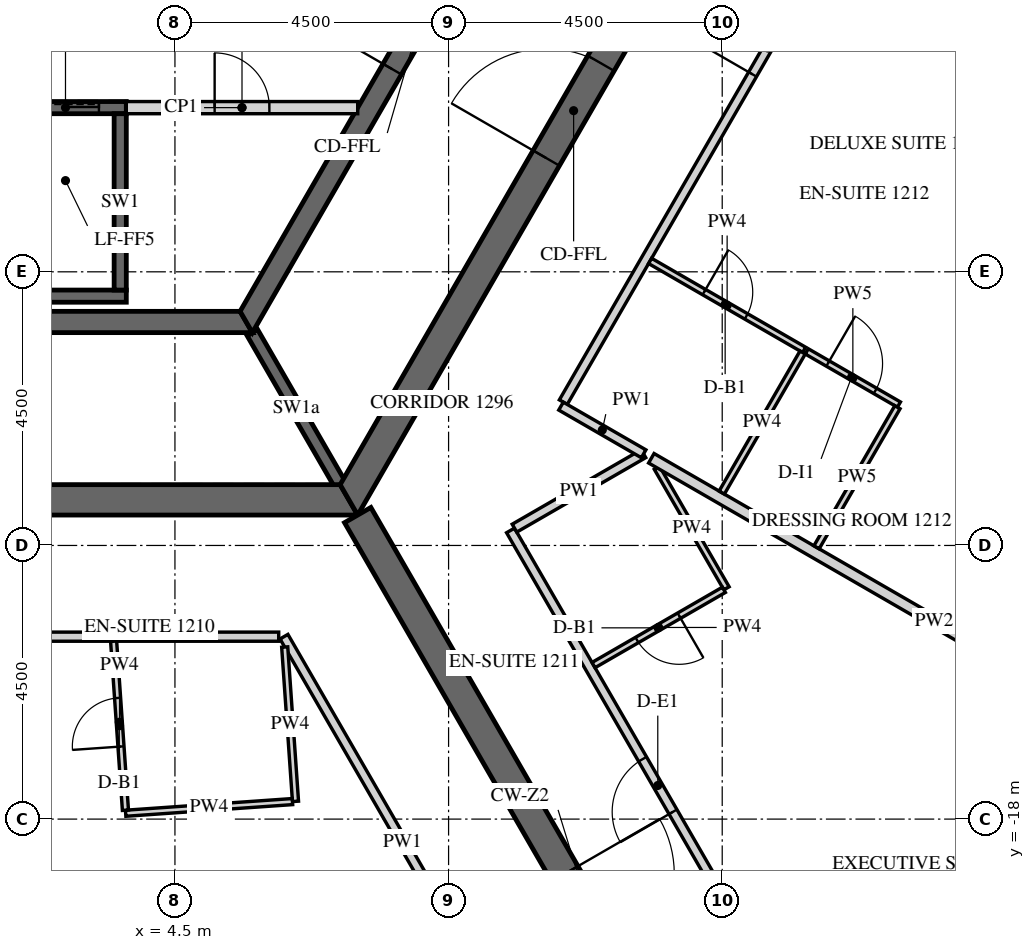
"""IFC4 building model, lengths in metres.
Left out: names, types, materials, properties, quantities, classifications, styles, units other than length and angle.
Written with IfcOpenShell. Run it as: python <this file> out.ifc"""

import sys

from ifc_helpers import new_model, si_unit, direction, frame, frame_2d, origin, place, context, subcontext, project, spatial, polyline, rectangle, outline, extrude, element, fill, save


model = new_model("IFC4")
c1 = context("Model", 3, precision=1e-05, world=origin(), true_north=direction((0.0, 1.0)))
c2 = subcontext(c1, "Body", "Model", "MODEL_VIEW")
j1 = project(units=[si_unit("LENGTHUNIT", "METRE"), si_unit("PLANEANGLEUNIT", "RADIAN")], contexts=[c1])
p1 = place(None, origin())
s1 = spatial("IfcSite", under=j1, at=p1, CompositionType="ELEMENT")
p2 = place(p1, origin())
s2 = spatial("IfcBuilding", under=s1, at=p2, CompositionType="ELEMENT")
p3 = place(p2, frame((0.0, 0.0, 164.4)))
s3 = spatial("IfcBuildingStorey", under=s2, at=p3, CompositionType="ELEMENT", Elevation=164.4)
p4 = place(p3, frame((-7.361, -12.75, -0.15), z_axis=(0.0, 0.0, 1.0), x_axis=(1.0, 0.0, 0.0)))
e1 = element("IfcWall", 1, at=p4, inside=s3, PredefinedType="SHEAR", context=c2, shape_type="SweptSolid", body=[
    extrude(outline(polyline([(-0.144, -0.25), (14.866, -0.25), (14.578, 0.25), (0.144, 0.25), (-0.144, -0.25)])), origin(), (0.0, 0.0, 1.0), 3.9),
])
p5 = place(p4, frame((6.761, 0.0, 0.15)))
e2 = element("IfcOpeningElement", 2, at=p5, cuts=e1, PredefinedType="OPENING", context=c2, shape_type="SweptSolid", body=[
    extrude(rectangle(XDim=1.2, YDim=2.4, at=frame_2d((0.6, 1.2))), frame((0.0, 0.26, 0.0), z_axis=(0.0, -1.0, 0.0), x_axis=(1.0, 0.0, 0.0)), (0.0, 0.0, 1.0), 0.52),
])
p6 = place(p3, frame((7.361, -12.75, -0.15), z_axis=(0.0, 0.0, 1.0), x_axis=(0.50000571537, 0.866022103989, 0.0)))
e3 = element("IfcWall", 3, at=p6, inside=s3, PredefinedType="SHEAR", context=c2, shape_type="SweptSolid", body=[
    extrude(outline(polyline([(-0.144, -0.25), (14.867, -0.25), (14.578, 0.25), (0.144, 0.25), (-0.144, -0.25)])), origin(), (0.0, 0.0, 1.0), 3.9),
])
p7 = place(p6, frame((6.49, 0.0, 0.15)))
e4 = element("IfcOpeningElement", 4, at=p7, cuts=e3, PredefinedType="OPENING", context=c2, shape_type="SweptSolid", body=[
    extrude(rectangle(XDim=1.8, YDim=2.4, at=frame_2d((0.9, 1.2))), frame((0.0, 0.26, 0.0), z_axis=(0.0, -1.0, 0.0), x_axis=(1.0, 0.0, 0.0)), (0.0, 0.0, 1.0), 0.52),
])
p8 = place(p3, frame((7.506, -13.0, -0.15), z_axis=(0.0, 0.0, 1.0), x_axis=(0.499988271576, -0.866032175087, 0.0)))
e5 = element("IfcWall", 5, at=p8, inside=s3, PredefinedType="SHEAR", context=c2, shape_type="SweptSolid", body=[
    extrude(rectangle(XDim=15.424, YDim=0.5, at=frame_2d((7.712, 0.0))), origin(), (0.0, 0.0, 1.0), 3.9),
])
p9 = place(p8, frame((6.812, 0.0, 0.15)))
e6 = element("IfcOpeningElement", 6, at=p9, cuts=e5, PredefinedType="OPENING", context=c2, shape_type="SweptSolid", body=[
    extrude(rectangle(XDim=1.8, YDim=2.4, at=frame_2d((0.9, 1.2))), frame((0.0, 0.26, 0.0), z_axis=(0.0, -1.0, 0.0), x_axis=(1.0, 0.0, 0.0)), (0.0, 0.0, 1.0), 0.52),
])
p10 = place(p3, frame((-5.673, -9.825, -0.15), z_axis=(0.0, 0.0, 1.0), x_axis=(1.0, 0.0, 0.0)))
e7 = element("IfcWall", 7, at=p10, inside=s3, PredefinedType="SHEAR", context=c2, shape_type="SweptSolid", body=[
    extrude(outline(polyline([(-0.101, -0.175), (11.446, -0.175), (11.244, 0.175), (0.101, 0.175), (-0.101, -0.175)])), origin(), (0.0, 0.0, 1.0), 3.9),
])
p11 = place(p3, frame((5.673, -9.825, -0.15), z_axis=(0.0, 0.0, 1.0), x_axis=(0.499995046907, 0.866028263435, 0.0)))
e8 = element("IfcWall", 8, at=p11, inside=s3, PredefinedType="SHEAR", context=c2, shape_type="SweptSolid", body=[
    extrude(outline(polyline([(-0.101, -0.175), (11.446, -0.175), (11.244, 0.175), (0.101, 0.175), (-0.101, -0.175)])), origin(), (0.0, 0.0, 1.0), 3.9),
])
p12 = place(p11, frame((4.801, 0.0, 0.15)))
e9 = element("IfcOpeningElement", 9, at=p12, cuts=e8, PredefinedType="OPENING", context=c2, shape_type="SweptSolid", body=[
    extrude(rectangle(XDim=1.8, YDim=2.4, at=frame_2d((0.9, 1.2))), frame((0.0, 0.185, 0.0), z_axis=(0.0, -1.0, 0.0), x_axis=(1.0, 0.0, 0.0)), (0.0, 0.0, 1.0), 0.37),
])
p13 = place(p3, frame((-5.5, -6.3, -0.25), z_axis=(0.0, 0.0, 1.0), x_axis=(1.0, 0.0, 0.0)))
e10 = element("IfcWall", 10, at=p13, inside=s3, PredefinedType="SHEAR", context=c2, shape_type="SweptSolid", body=[
    extrude(rectangle(XDim=9.2, YDim=0.2, at=frame_2d((4.6, 0.0))), origin(), (0.0, 0.0, 1.0), 3.9),
])
p14 = place(p13, frame((0.45, 0.0, 0.25)))
e11 = element("IfcOpeningElement", 11, at=p14, cuts=e10, PredefinedType="OPENING", context=c2, shape_type="SweptSolid", body=[
    extrude(rectangle(XDim=1.1, YDim=2.1, at=frame_2d((0.55, 1.05))), frame((0.0, 0.11, 0.0), z_axis=(0.0, -1.0, 0.0), x_axis=(1.0, 0.0, 0.0)), (0.0, 0.0, 1.0), 0.22),
])
p15 = place(p13, frame((2.25, 0.0, 0.25)))
e12 = element("IfcOpeningElement", 12, at=p15, cuts=e10, PredefinedType="OPENING", context=c2, shape_type="SweptSolid", body=[
    extrude(rectangle(XDim=1.1, YDim=2.1, at=frame_2d((0.55, 1.05))), frame((0.0, 0.11, 0.0), z_axis=(0.0, -1.0, 0.0), x_axis=(1.0, 0.0, 0.0)), (0.0, 0.0, 1.0), 0.22),
])
p16 = place(p13, frame((4.05, 0.0, 0.25)))
e13 = element("IfcOpeningElement", 13, at=p16, cuts=e10, PredefinedType="OPENING", context=c2, shape_type="SweptSolid", body=[
    extrude(rectangle(XDim=1.1, YDim=2.1, at=frame_2d((0.55, 1.05))), frame((0.0, 0.11, 0.0), z_axis=(0.0, -1.0, 0.0), x_axis=(1.0, 0.0, 0.0)), (0.0, 0.0, 1.0), 0.22),
])
p17 = place(p13, frame((5.85, 0.0, 0.25)))
e14 = element("IfcOpeningElement", 14, at=p17, cuts=e10, PredefinedType="OPENING", context=c2, shape_type="SweptSolid", body=[
    extrude(rectangle(XDim=1.1, YDim=2.1, at=frame_2d((0.55, 1.05))), frame((0.0, 0.11, 0.0), z_axis=(0.0, -1.0, 0.0), x_axis=(1.0, 0.0, 0.0)), (0.0, 0.0, 1.0), 0.22),
])
p18 = place(p13, frame((7.65, 0.0, 0.25)))
e15 = element("IfcOpeningElement", 15, at=p18, cuts=e10, PredefinedType="OPENING", context=c2, shape_type="SweptSolid", body=[
    extrude(rectangle(XDim=1.1, YDim=2.1, at=frame_2d((0.55, 1.05))), frame((0.0, 0.11, 0.0), z_axis=(0.0, -1.0, 0.0), x_axis=(1.0, 0.0, 0.0)), (0.0, 0.0, 1.0), 0.22),
])
p19 = place(p3, frame((-5.5, -9.4, -0.25), z_axis=(0.0, 0.0, 1.0), x_axis=(1.0, 0.0, 0.0)))
e16 = element("IfcWall", 16, at=p19, inside=s3, PredefinedType="SHEAR", context=c2, shape_type="SweptSolid", body=[
    extrude(rectangle(XDim=9.2, YDim=0.2, at=frame_2d((4.6, 0.0))), origin(), (0.0, 0.0, 1.0), 3.9),
])
p20 = place(p3, frame((3.6, -9.3, -0.25), z_axis=(0.0, 0.0, 1.0), x_axis=(0.0, 1.0, 0.0)))
e17 = element("IfcWall", 17, at=p20, inside=s3, PredefinedType="SHEAR", context=c2, shape_type="SweptSolid", body=[
    extrude(rectangle(XDim=2.9, YDim=0.2, at=frame_2d((1.45, 0.0))), origin(), (0.0, 0.0, 1.0), 3.9),
])
p21 = place(p3, frame((3.7, -6.3, 0.0), z_axis=(0.0, 0.0, 1.0), x_axis=(1.0, 0.0, 0.0)))
e18 = element("IfcWall", 18, at=p21, inside=s3, PredefinedType="PARTITIONING", context=c2, shape_type="SweptSolid", body=[
    extrude(rectangle(XDim=3.806, YDim=0.2, at=frame_2d((1.903, 0.0))), origin(), (0.0, 0.0, 1.0), 3.65),
])
p22 = place(p21, frame((1.453, 0.0, 0.0)))
e19 = element("IfcOpeningElement", 19, at=p22, cuts=e18, PredefinedType="OPENING", context=c2, shape_type="SweptSolid", body=[
    extrude(rectangle(XDim=0.9, YDim=2.1, at=frame_2d((0.45, 1.05))), frame((0.0, 0.11, 0.0), z_axis=(0.0, -1.0, 0.0), x_axis=(1.0, 0.0, 0.0)), (0.0, 0.0, 1.0), 0.22),
])
p23 = place(p3, frame((5.773, -10.0, -0.15), z_axis=(0.0, 0.0, 1.0), x_axis=(0.499995765644, -0.866027848477, 0.0)))
e20 = element("IfcWall", 20, at=p23, inside=s3, PredefinedType="SHEAR", context=c2, shape_type="SweptSolid", body=[
    extrude(rectangle(XDim=2.887, YDim=0.2, at=frame_2d((1.443, 0.0))), origin(), (0.0, 0.0, 1.0), 3.9),
])
p24 = place(p3, frame((-8.574, -15.0, 0.0), z_axis=(0.0, 0.0, 1.0), x_axis=(1.0, 0.0, 0.0)))
e21 = element("IfcWall", 21, at=p24, inside=s3, PredefinedType="PARTITIONING", context=c2, shape_type="SweptSolid", body=[
    extrude(rectangle(XDim=14.78, YDim=0.15, at=frame_2d((7.39, 0.0))), origin(), (0.0, 0.0, 1.0), 2.988),
])
p25 = place(p24, frame((4.445, 0.0, 0.0)))
e22 = element("IfcOpeningElement", 22, at=p25, cuts=e21, PredefinedType="OPENING", context=c2, shape_type="SweptSolid", body=[
    extrude(rectangle(XDim=1.0, YDim=2.1, at=frame_2d((0.5, 1.05))), frame((0.0, 0.085, 0.0), z_axis=(0.0, -1.0, 0.0), x_axis=(1.0, 0.0, 0.0)), (0.0, 0.0, 1.0), 0.17),
])
p26 = place(p24, frame((8.885, 0.0, 0.0)))
e23 = element("IfcOpeningElement", 23, at=p26, cuts=e21, PredefinedType="OPENING", context=c2, shape_type="SweptSolid", body=[
    extrude(rectangle(XDim=1.0, YDim=2.1, at=frame_2d((0.5, 1.05))), frame((0.0, 0.085, 0.0), z_axis=(0.0, -1.0, 0.0), x_axis=(1.0, 0.0, 0.0)), (0.0, 0.0, 1.0), 0.17),
])
p27 = place(p3, frame((6.293, -15.0, 0.0), z_axis=(0.0, 0.0, 1.0), x_axis=(0.499980313799, -0.86603676932, 0.0)))
e24 = element("IfcWall", 24, at=p27, inside=s3, PredefinedType="PARTITIONING", context=c2, shape_type="SweptSolid", body=[
    extrude(rectangle(XDim=7.786, YDim=0.15, at=frame_2d((3.893, 0.0))), origin(), (0.0, 0.0, 1.0), 2.988),
])
p28 = place(p3, frame((13.699, -19.628, 0.0), z_axis=(0.0, 0.0, 1.0), x_axis=(-0.499995202058, 0.86602817386, 0.0)))
e25 = element("IfcWall", 25, at=p28, inside=s3, PredefinedType="PARTITIONING", context=c2, shape_type="SweptSolid", body=[
    extrude(rectangle(XDim=7.361, YDim=0.15, at=frame_2d((3.68, 0.0))), origin(), (0.0, 0.0, 1.0), 2.988),
])
p29 = place(p28, frame((2.018, 0.0, 0.0)))
e26 = element("IfcOpeningElement", 26, at=p29, cuts=e25, PredefinedType="OPENING", context=c2, shape_type="SweptSolid", body=[
    extrude(rectangle(XDim=1.0, YDim=2.1, at=frame_2d((0.5, 1.05))), frame((0.0, 0.085, 0.0), z_axis=(0.0, -1.0, 0.0), x_axis=(1.0, 0.0, 0.0)), (0.0, 0.0, 1.0), 0.17),
])
p30 = place(p3, frame((10.084, -13.216, 0.0), z_axis=(0.0, 0.0, 1.0), x_axis=(0.866026229868, 0.499998569178, 0.0)))
e27 = element("IfcWall", 27, at=p30, inside=s3, PredefinedType="PARTITIONING", context=c2, shape_type="SweptSolid", body=[
    extrude(rectangle(XDim=2.449, YDim=0.15, at=frame_2d((1.225, 0.0))), origin(), (0.0, 0.0, 1.0), 2.988),
])
p31 = place(p3, frame((10.887, -11.144, 0.0), z_axis=(0.0, 0.0, 1.0), x_axis=(0.500006037985, 0.866021917724, 0.0)))
e28 = element("IfcWall", 28, at=p31, inside=s3, PredefinedType="PARTITIONING", context=c2, shape_type="SweptSolid", body=[
    extrude(rectangle(XDim=12.867, YDim=0.15, at=frame_2d((6.434, 0.0))), origin(), (0.0, 0.0, 1.0), 2.988),
])
p32 = place(p31, frame((6.225, 0.0, 0.0)))
e29 = element("IfcOpeningElement", 29, at=p32, cuts=e28, PredefinedType="OPENING", context=c2, shape_type="SweptSolid", body=[
    extrude(rectangle(XDim=1.0, YDim=2.1, at=frame_2d((0.5, 1.05))), frame((0.0, 0.085, 0.0), z_axis=(0.0, -1.0, 0.0), x_axis=(1.0, 0.0, 0.0)), (0.0, 0.0, 1.0), 0.17),
])
p33 = place(p31, frame((11.717, 0.0, 0.0)))
e30 = element("IfcOpeningElement", 30, at=p33, cuts=e28, PredefinedType="OPENING", context=c2, shape_type="SweptSolid", body=[
    extrude(rectangle(XDim=1.0, YDim=2.1, at=frame_2d((0.5, 1.05))), frame((0.0, 0.085, 0.0), z_axis=(0.0, -1.0, 0.0), x_axis=(1.0, 0.0, 0.0)), (0.0, 0.0, 1.0), 0.17),
])
p34 = place(p3, frame((12.208, -11.993, 0.0), z_axis=(0.0, 0.0, 1.0), x_axis=(-0.866011891242, 0.50002340368, 0.0)))
e31 = element("IfcWall", 31, at=p34, inside=s3, PredefinedType="PARTITIONING", context=c2, shape_type="SweptSolid", body=[
    extrude(rectangle(XDim=1.568, YDim=0.15, at=frame_2d((0.784, 0.0))), origin(), (0.0, 0.0, 1.0), 2.988),
])
p35 = place(p3, frame((6.305, -15.171, 0.0), z_axis=(0.0, 0.0, 1.0), x_axis=(0.069671554491, -0.99756998476, 0.0)))
e32 = element("IfcWall", 32, at=p35, inside=s3, PredefinedType="PARTITIONING", context=c2, shape_type="SweptSolid", body=[
    extrude(rectangle(XDim=2.544, YDim=0.1, at=frame_2d((1.272, 0.0))), origin(), (0.0, 0.0, 1.0), 2.988),
])
p36 = place(p3, frame((6.433, -17.712, 0.0), z_axis=(0.0, 0.0, 1.0), x_axis=(-0.997562614302, -0.069777005859, 0.0)))
e33 = element("IfcWall", 33, at=p36, inside=s3, PredefinedType="PARTITIONING", context=c2, shape_type="SweptSolid", body=[
    extrude(rectangle(XDim=2.75, YDim=0.1, at=frame_2d((1.375, 0.0))), origin(), (0.0, 0.0, 1.0), 2.988),
])
p37 = place(p3, frame((3.686, -17.854, 0.0), z_axis=(0.0, 0.0, 1.0), x_axis=(-0.069758488261, 0.997563909389, 0.0)))
e34 = element("IfcWall", 34, at=p37, inside=s3, PredefinedType="PARTITIONING", context=c2, shape_type="SweptSolid", body=[
    extrude(rectangle(XDim=2.786, YDim=0.1, at=frame_2d((1.393, 0.0))), origin(), (0.0, 0.0, 1.0), 2.988),
])
p38 = place(p37, frame((1.05, 0.0, 0.0)))
e35 = element("IfcOpeningElement", 35, at=p38, cuts=e34, PredefinedType="OPENING", context=c2, shape_type="SweptSolid", body=[
    extrude(rectangle(XDim=0.8, YDim=2.1, at=frame_2d((0.4, 1.05))), frame((0.0, 0.06, 0.0), z_axis=(0.0, -1.0, 0.0), x_axis=(1.0, 0.0, 0.0)), (0.0, 0.0, 1.0), 0.12),
])
p39 = place(p3, frame((12.426, -12.223, 0.0), z_axis=(0.0, 0.0, 1.0), x_axis=(0.499959451571, -0.866048813165, 0.0)))
e36 = element("IfcWall", 36, at=p39, inside=s3, PredefinedType="PARTITIONING", context=c2, shape_type="SweptSolid", body=[
    extrude(rectangle(XDim=2.289, YDim=0.1, at=frame_2d((1.145, 0.0))), origin(), (0.0, 0.0, 1.0), 2.988),
])
p40 = place(p3, frame((13.527, -14.23, 0.0), z_axis=(0.0, 0.0, 1.0), x_axis=(-0.866006523861, -0.500032699561, 0.0)))
e37 = element("IfcWall", 37, at=p40, inside=s3, PredefinedType="PARTITIONING", context=c2, shape_type="SweptSolid", body=[
    extrude(rectangle(XDim=2.475, YDim=0.1, at=frame_2d((1.237, 0.0))), origin(), (0.0, 0.0, 1.0), 2.988),
])
p41 = place(p40, frame((0.85, 0.0, 0.0)))
e38 = element("IfcOpeningElement", 38, at=p41, cuts=e37, PredefinedType="OPENING", context=c2, shape_type="SweptSolid", body=[
    extrude(rectangle(XDim=0.8, YDim=2.1, at=frame_2d((0.4, 1.05))), frame((0.0, 0.06, 0.0), z_axis=(0.0, -1.0, 0.0), x_axis=(1.0, 0.0, 0.0)), (0.0, 0.0, 1.0), 0.12),
])
p42 = place(p3, frame((21.631, -17.433, 0.0), z_axis=(0.0, 0.0, 1.0), x_axis=(-0.866030310389, 0.499991501415, 0.0)))
e39 = element("IfcWall", 39, at=p42, inside=s3, PredefinedType="PARTITIONING", context=c2, shape_type="SweptSolid", body=[
    extrude(rectangle(XDim=10.735, YDim=0.18, at=frame_2d((5.368, 0.0))), origin(), (0.0, 0.0, 1.0), 2.988),
])
p43 = place(p3, frame((12.314, -8.821, 0.0), z_axis=(0.0, 0.0, 1.0), x_axis=(0.866046596414, -0.499963291492, 0.0)))
e40 = element("IfcWall", 40, at=p43, inside=s3, PredefinedType="PARTITIONING", context=c2, shape_type="SweptSolid", body=[
    extrude(rectangle(XDim=2.925, YDim=0.1, at=frame_2d((1.462, 0.0))), origin(), (0.0, 0.0, 1.0), 2.988),
])
p44 = place(p43, frame((1.025, 0.0, 0.0)))
e41 = element("IfcOpeningElement", 41, at=p44, cuts=e40, PredefinedType="OPENING", context=c2, shape_type="SweptSolid", body=[
    extrude(rectangle(XDim=0.8, YDim=2.1, at=frame_2d((0.4, 1.05))), frame((0.0, 0.06, 0.0), z_axis=(0.0, -1.0, 0.0), x_axis=(1.0, 0.0, 0.0)), (0.0, 0.0, 1.0), 0.12),
])
p45 = place(p3, frame((14.891, -10.309, 0.0), z_axis=(0.0, 0.0, 1.0), x_axis=(0.866036909293, -0.499980071345, 0.0)))
e42 = element("IfcWall", 42, at=p45, inside=s3, PredefinedType="PARTITIONING", context=c2, shape_type="SweptSolid", body=[
    extrude(rectangle(XDim=1.75, YDim=0.1, at=frame_2d((0.875, 0.0))), origin(), (0.0, 0.0, 1.0), 2.988),
])
p46 = place(p45, frame((0.4, 0.0, 0.0)))
e43 = element("IfcOpeningElement", 43, at=p46, cuts=e42, PredefinedType="OPENING", context=c2, shape_type="SweptSolid", body=[
    extrude(rectangle(XDim=0.9, YDim=2.1, at=frame_2d((0.45, 1.05))), frame((0.0, 0.06, 0.0), z_axis=(0.0, -1.0, 0.0), x_axis=(1.0, 0.0, 0.0)), (0.0, 0.0, 1.0), 0.12),
])
p47 = place(p3, frame((16.381, -11.227, 0.0), z_axis=(0.0, 0.0, 1.0), x_axis=(-0.500008456887, -0.866020521143, 0.0)))
e44 = element("IfcWall", 44, at=p47, inside=s3, PredefinedType="PARTITIONING", context=c2, shape_type="SweptSolid", body=[
    extrude(rectangle(XDim=2.66, YDim=0.1, at=frame_2d((1.33, 0.0))), origin(), (0.0, 0.0, 1.0), 2.988),
])
p48 = place(p3, frame((27.031, -8.08, 0.0), z_axis=(0.0, 0.0, 1.0), x_axis=(-0.866024931941, 0.500000817256, 0.0)))
e45 = element("IfcWall", 45, at=p48, inside=s3, PredefinedType="PARTITIONING", context=c2, shape_type="SweptSolid", body=[
    extrude(rectangle(XDim=12.375, YDim=0.18, at=frame_2d((6.188, 0.0))), origin(), (0.0, 0.0, 1.0), 2.988),
])
p49 = place(p3, frame((13.492, -12.63, 0.0), z_axis=(0.0, 0.0, 1.0), x_axis=(0.50004820116, 0.865997573043, 0.0)))
e46 = element("IfcWall", 46, at=p49, inside=s3, PredefinedType="PARTITIONING", context=c2, shape_type="SweptSolid", body=[
    extrude(rectangle(XDim=2.66, YDim=0.1, at=frame_2d((1.33, 0.0))), origin(), (0.0, 0.0, 1.0), 2.988),
])
p50 = place(p7, origin())
e47 = element("IfcDoor", 47, at=p50, inside=s3, OperationType="DOUBLE_DOOR_SINGLE_SWING", PredefinedType="DOOR", context=c2, shape_type="SweptSolid", body=[
    extrude(rectangle(XDim=1.8, YDim=2.4, at=frame_2d((0.9, 1.2))), frame((0.0, 0.025, 0.0), z_axis=(0.0, -1.0, 0.0), x_axis=(1.0, 0.0, 0.0)), (0.0, 0.0, 1.0), 0.05),
])
fill(e4, e47)
p51 = place(p12, origin())
e48 = element("IfcDoor", 48, at=p51, inside=s3, OperationType="DOUBLE_DOOR_SINGLE_SWING", PredefinedType="DOOR", context=c2, shape_type="SweptSolid", body=[
    extrude(rectangle(XDim=1.8, YDim=2.4, at=frame_2d((0.9, 1.2))), frame((0.0, 0.025, 0.0), z_axis=(0.0, -1.0, 0.0), x_axis=(1.0, 0.0, 0.0)), (0.0, 0.0, 1.0), 0.05),
])
fill(e9, e48)
p52 = place(p22, origin())
e49 = element("IfcDoor", 49, at=p52, inside=s3, OperationType="SINGLE_SWING_LEFT", PredefinedType="DOOR", context=c2, shape_type="SweptSolid", body=[
    extrude(rectangle(XDim=0.9, YDim=2.1, at=frame_2d((0.45, 1.05))), frame((0.0, 0.025, 0.0), z_axis=(0.0, -1.0, 0.0), x_axis=(1.0, 0.0, 0.0)), (0.0, 0.0, 1.0), 0.05),
])
fill(e19, e49)
p53 = place(p18, origin())
e50 = element("IfcDoor", 50, at=p53, inside=s3, OperationType="SLIDING_TO_LEFT", PredefinedType="DOOR", context=c2, shape_type="SweptSolid", body=[
    extrude(rectangle(XDim=1.1, YDim=2.1, at=frame_2d((0.55, 1.05))), frame((0.0, 0.025, 0.0), z_axis=(0.0, -1.0, 0.0), x_axis=(1.0, 0.0, 0.0)), (0.0, 0.0, 1.0), 0.05),
])
fill(e15, e50)
p54 = place(p38, origin())
e51 = element("IfcDoor", 51, at=p54, inside=s3, OperationType="SINGLE_SWING_LEFT", PredefinedType="DOOR", context=c2, shape_type="SweptSolid", body=[
    extrude(rectangle(XDim=0.8, YDim=2.1, at=frame_2d((0.4, 1.05))), frame((0.0, 0.025, 0.0), z_axis=(0.0, -1.0, 0.0), x_axis=(1.0, 0.0, 0.0)), (0.0, 0.0, 1.0), 0.05),
])
fill(e35, e51)
p55 = place(p29, origin())
e52 = element("IfcDoor", 52, at=p55, inside=s3, OperationType="SINGLE_SWING_LEFT", PredefinedType="DOOR", context=c2, shape_type="SweptSolid", body=[
    extrude(rectangle(XDim=1.0, YDim=2.1, at=frame_2d((0.5, 1.05))), frame((0.0, 0.025, 0.0), z_axis=(0.0, -1.0, 0.0), x_axis=(1.0, 0.0, 0.0)), (0.0, 0.0, 1.0), 0.05),
])
fill(e26, e52)
p56 = place(p41, origin())
e53 = element("IfcDoor", 53, at=p56, inside=s3, OperationType="SINGLE_SWING_RIGHT", PredefinedType="DOOR", context=c2, shape_type="SweptSolid", body=[
    extrude(rectangle(XDim=0.8, YDim=2.1, at=frame_2d((0.4, 1.05))), frame((0.0, 0.025, 0.0), z_axis=(0.0, -1.0, 0.0), x_axis=(1.0, 0.0, 0.0)), (0.0, 0.0, 1.0), 0.05),
])
fill(e38, e53)
p57 = place(p32, origin())
e54 = element("IfcDoor", 54, at=p57, inside=s3, OperationType="SINGLE_SWING_LEFT", PredefinedType="DOOR", context=c2, shape_type="SweptSolid", body=[
    extrude(rectangle(XDim=1.0, YDim=2.1, at=frame_2d((0.5, 1.05))), frame((0.0, 0.025, 0.0), z_axis=(0.0, -1.0, 0.0), x_axis=(1.0, 0.0, 0.0)), (0.0, 0.0, 1.0), 0.05),
])
fill(e29, e54)
p58 = place(p44, origin())
e55 = element("IfcDoor", 55, at=p58, inside=s3, OperationType="SINGLE_SWING_RIGHT", PredefinedType="DOOR", context=c2, shape_type="SweptSolid", body=[
    extrude(rectangle(XDim=0.8, YDim=2.1, at=frame_2d((0.4, 1.05))), frame((0.0, 0.025, 0.0), z_axis=(0.0, -1.0, 0.0), x_axis=(1.0, 0.0, 0.0)), (0.0, 0.0, 1.0), 0.05),
])
fill(e41, e55)
p59 = place(p46, origin())
e56 = element("IfcDoor", 56, at=p59, inside=s3, OperationType="SINGLE_SWING_RIGHT", PredefinedType="DOOR", context=c2, shape_type="SweptSolid", body=[
    extrude(rectangle(XDim=0.9, YDim=2.1, at=frame_2d((0.45, 1.05))), frame((0.0, 0.025, 0.0), z_axis=(0.0, -1.0, 0.0), x_axis=(1.0, 0.0, 0.0)), (0.0, 0.0, 1.0), 0.05),
])
fill(e43, e56)
save(model, sys.argv[1])
